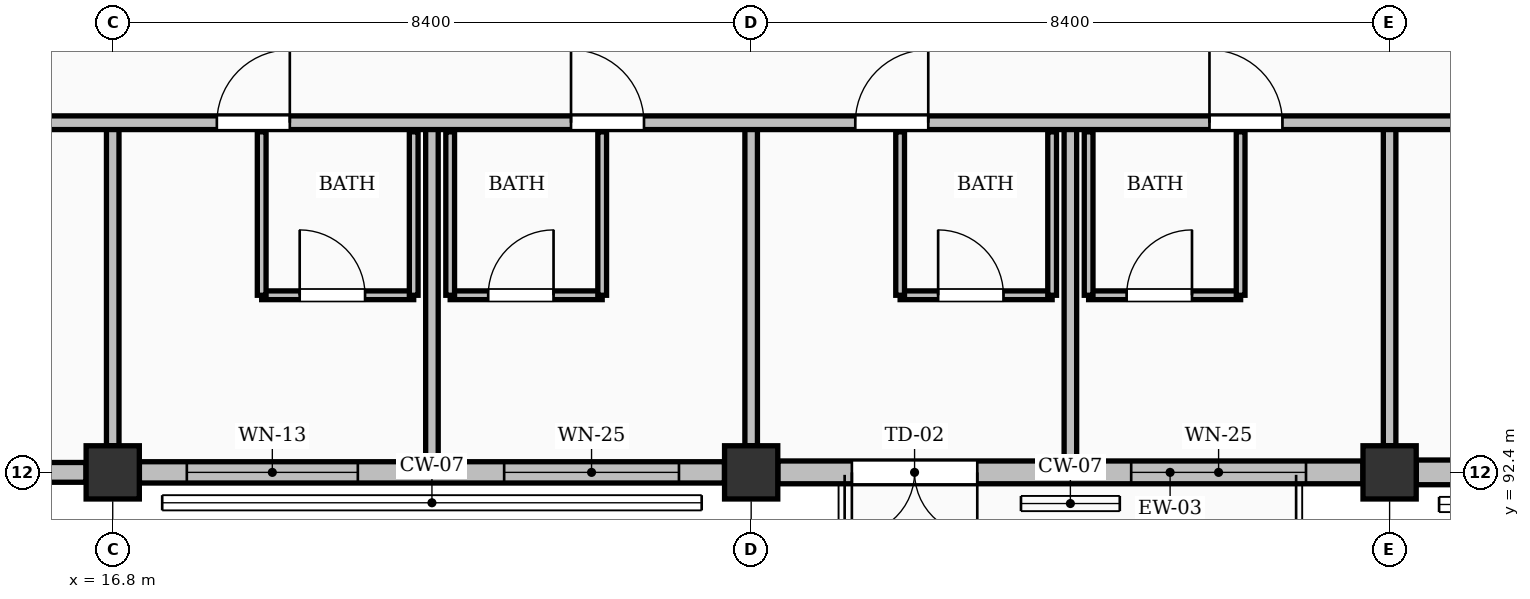
"""IFC4 building model, lengths in metres.
Left out: names, types, materials, properties, quantities, classifications, styles, units other than length and angle.
Written with IfcOpenShell. Run it as: python <this file> out.ifc"""

import sys

from ifc_helpers import new_model, si_unit, direction, frame, frame_2d, origin, origin_2d, place, context, subcontext, project, spatial, rectangle, extrude, element, fill, save


model = new_model("IFC4")
c1 = context("Model", 3, precision=1e-05, world=origin(), true_north=direction((0.0, 1.0)))
c2 = subcontext(c1, "Body", "Model", "MODEL_VIEW")
j1 = project(units=[si_unit("LENGTHUNIT", "METRE"), si_unit("PLANEANGLEUNIT", "RADIAN")], contexts=[c1])
p1 = place(None, origin())
s1 = spatial("IfcSite", under=j1, at=p1, CompositionType="ELEMENT")
p2 = place(p1, origin())
s2 = spatial("IfcBuilding", under=s1, at=p2, CompositionType="ELEMENT")
p3 = place(p2, frame((0.0, 0.0, 18.48)))
s3 = spatial("IfcBuildingStorey", under=s2, at=p3, CompositionType="ELEMENT", Elevation=18.48)
for number, where, z_axis, x_axis in (
    (1, (16.8, 92.4, 0.0), (0.0, 0.0, 1.0), (1.0, 0.0, 0.0)),
    (2, (25.2, 92.4, 0.0), (0.0, 0.0, 1.0), (1.0, 0.0, 0.0)),
    (3, (33.6, 92.4, 0.0), (0.0, 0.0, 1.0), (1.0, 0.0, 0.0)),
):
    element("IfcColumn", number, at=place(p3, frame(where, z_axis=z_axis, x_axis=x_axis)), inside=s3, PredefinedType="COLUMN", context=c2, shape_type="SweptSolid", body=[
        extrude(rectangle(XDim=0.7, YDim=0.7, at=origin_2d()), origin(), (0.0, 0.0, 1.0), 3.36),
    ])
p4 = place(p3, frame((8.751, 92.4, 0.0), z_axis=(0.0, 0.0, 1.0), x_axis=(1.0, 0.0, 0.0)))
e4 = element("IfcWall", 4, at=p4, inside=s3, PredefinedType="SOLIDWALL", context=c2, shape_type="SweptSolid", body=[
    extrude(rectangle(XDim=7.698, YDim=0.26, at=frame_2d((3.849, 0.0))), origin(), (0.0, 0.0, 1.0), 2.494),
])
p5 = place(p4, frame((1.024, 0.0, 0.0)))
e5 = element("IfcOpeningElement", 5, at=p5, cuts=e4, PredefinedType="OPENING", context=c2, shape_type="SweptSolid", body=[
    extrude(rectangle(XDim=1.55, YDim=2.08, at=frame_2d((0.775, 1.04))), frame((0.0, 0.14, 0.0), z_axis=(0.0, -1.0, 0.0), x_axis=(1.0, 0.0, 0.0)), (0.0, 0.0, 1.0), 0.28),
])
p6 = place(p4, frame((4.624, 0.0, 0.25)))
e6 = element("IfcOpeningElement", 6, at=p6, cuts=e4, PredefinedType="OPENING", context=c2, shape_type="SweptSolid", body=[
    extrude(rectangle(XDim=2.35, YDim=1.95, at=frame_2d((1.175, 0.975))), frame((0.0, 0.14, 0.0), z_axis=(0.0, -1.0, 0.0), x_axis=(1.0, 0.0, 0.0)), (0.0, 0.0, 1.0), 0.28),
])
p7 = place(p3, frame((17.151, 92.4, 0.0), z_axis=(0.0, 0.0, 1.0), x_axis=(1.0, 0.0, 0.0)))
e7 = element("IfcWall", 7, at=p7, inside=s3, PredefinedType="SOLIDWALL", context=c2, shape_type="SweptSolid", body=[
    extrude(rectangle(XDim=7.698, YDim=0.28, at=frame_2d((3.849, 0.0))), origin(), (0.0, 0.0, 1.0), 2.494),
])
p8 = place(p7, frame((0.624, 0.0, 0.25)))
e8 = element("IfcOpeningElement", 8, at=p8, cuts=e7, PredefinedType="OPENING", context=c2, shape_type="SweptSolid", body=[
    extrude(rectangle(XDim=2.25, YDim=2.05, at=frame_2d((1.125, 1.025))), frame((0.0, 0.15, 0.0), z_axis=(0.0, -1.0, 0.0), x_axis=(1.0, 0.0, 0.0)), (0.0, 0.0, 1.0), 0.3),
])
p9 = place(p7, frame((4.799, 0.0, 0.25)))
e9 = element("IfcOpeningElement", 9, at=p9, cuts=e7, PredefinedType="OPENING", context=c2, shape_type="SweptSolid", body=[
    extrude(rectangle(XDim=2.3, YDim=1.75, at=frame_2d((1.15, 0.875))), frame((0.0, 0.15, 0.0), z_axis=(0.0, -1.0, 0.0), x_axis=(1.0, 0.0, 0.0)), (0.0, 0.0, 1.0), 0.3),
])
p10 = place(p3, frame((25.551, 92.4, 0.0), z_axis=(0.0, 0.0, 1.0), x_axis=(1.0, 0.0, 0.0)))
e10 = element("IfcWall", 10, at=p10, inside=s3, PredefinedType="SOLIDWALL", context=c2, shape_type="SweptSolid", body=[
    extrude(rectangle(XDim=7.698, YDim=0.3, at=frame_2d((3.849, 0.0))), origin(), (0.0, 0.0, 1.0), 2.494),
])
p11 = place(p10, frame((0.974, 0.0, 0.0)))
e11 = element("IfcOpeningElement", 11, at=p11, cuts=e10, PredefinedType="OPENING", context=c2, shape_type="SweptSolid", body=[
    extrude(rectangle(XDim=1.65, YDim=2.08, at=frame_2d((0.825, 1.04))), frame((0.0, 0.16, 0.0), z_axis=(0.0, -1.0, 0.0), x_axis=(1.0, 0.0, 0.0)), (0.0, 0.0, 1.0), 0.32),
])
p12 = place(p10, frame((4.649, 0.0, 0.25)))
e12 = element("IfcOpeningElement", 12, at=p12, cuts=e10, PredefinedType="OPENING", context=c2, shape_type="SweptSolid", body=[
    extrude(rectangle(XDim=2.3, YDim=1.75, at=frame_2d((1.15, 0.875))), frame((0.0, 0.16, 0.0), z_axis=(0.0, -1.0, 0.0), x_axis=(1.0, 0.0, 0.0)), (0.0, 0.0, 1.0), 0.32),
])
p13 = place(p3, frame((33.951, 92.4, 0.0), z_axis=(0.0, 0.0, 1.0), x_axis=(1.0, 0.0, 0.0)))
e13 = element("IfcWall", 13, at=p13, inside=s3, PredefinedType="SOLIDWALL", context=c2, shape_type="SweptSolid", body=[
    extrude(rectangle(XDim=7.698, YDim=0.325, at=frame_2d((3.849, 0.0))), origin(), (0.0, 0.0, 1.0), 2.494),
])
p14 = place(p13, frame((0.549, 0.0, 0.25)))
e14 = element("IfcOpeningElement", 14, at=p14, cuts=e13, PredefinedType="OPENING", context=c2, shape_type="SweptSolid", body=[
    extrude(rectangle(XDim=2.4, YDim=1.75, at=frame_2d((1.2, 0.875))), frame((0.0, 0.172, 0.0), z_axis=(0.0, -1.0, 0.0), x_axis=(1.0, 0.0, 0.0)), (0.0, 0.0, 1.0), 0.345),
])
p15 = place(p13, frame((4.789, 0.0, 0.25)))
e15 = element("IfcOpeningElement", 15, at=p15, cuts=e13, PredefinedType="OPENING", context=c2, shape_type="SweptSolid", body=[
    extrude(rectangle(XDim=2.32, YDim=1.9, at=frame_2d((1.16, 0.95))), frame((0.0, 0.172, 0.0), z_axis=(0.0, -1.0, 0.0), x_axis=(1.0, 0.0, 0.0)), (0.0, 0.0, 1.0), 0.345),
])
p16 = place(p3, frame((18.76, 94.73, 0.0), z_axis=(0.0, 0.0, 1.0), x_axis=(1.0, 0.0, 0.0)))
e16 = element("IfcWall", 16, at=p16, inside=s3, PredefinedType="PARTITIONING", context=c2, shape_type="SweptSolid", body=[
    extrude(rectangle(XDim=2.0, YDim=0.115, at=frame_2d((1.0, 0.0))), origin(), (0.0, 0.0, 1.0), 3.12),
])
p17 = place(p16, frame((0.5, 0.0, 0.0)))
e17 = element("IfcOpeningElement", 17, at=p17, cuts=e16, PredefinedType="OPENING", context=c2, shape_type="SweptSolid", body=[
    extrude(rectangle(XDim=0.86, YDim=2.05, at=frame_2d((0.43, 1.025))), frame((0.0, 0.067, 0.0), z_axis=(0.0, -1.0, 0.0), x_axis=(1.0, 0.0, 0.0)), (0.0, 0.0, 1.0), 0.135),
])
p18 = place(p3, frame((18.76, 94.73, 0.0), z_axis=(0.0, 0.0, 1.0), x_axis=(0.0, 1.0, 0.0)))
e18 = element("IfcWall", 18, at=p18, inside=s3, PredefinedType="PARTITIONING", context=c2, shape_type="SweptSolid", body=[
    extrude(rectangle(XDim=2.15, YDim=0.115, at=frame_2d((1.075, 0.0))), origin(), (0.0, 0.0, 1.0), 2.642),
])
p19 = place(p3, frame((20.76, 94.73, 0.0), z_axis=(0.0, 0.0, 1.0), x_axis=(0.0, 1.0, 0.0)))
e19 = element("IfcWall", 19, at=p19, inside=s3, PredefinedType="PARTITIONING", context=c2, shape_type="SweptSolid", body=[
    extrude(rectangle(XDim=2.15, YDim=0.115, at=frame_2d((1.075, 0.0))), origin(), (0.0, 0.0, 1.0), 3.12),
])
p20 = place(p3, frame((21.24, 94.73, 0.0), z_axis=(0.0, 0.0, 1.0), x_axis=(1.0, 0.0, 0.0)))
e20 = element("IfcWall", 20, at=p20, inside=s3, PredefinedType="PARTITIONING", context=c2, shape_type="SweptSolid", body=[
    extrude(rectangle(XDim=2.0, YDim=0.115, at=frame_2d((1.0, 0.0))), origin(), (0.0, 0.0, 1.0), 3.12),
])
p21 = place(p20, frame((0.5, 0.0, 0.0)))
e21 = element("IfcOpeningElement", 21, at=p21, cuts=e20, PredefinedType="OPENING", context=c2, shape_type="SweptSolid", body=[
    extrude(rectangle(XDim=0.86, YDim=2.05, at=frame_2d((0.43, 1.025))), frame((0.0, 0.067, 0.0), z_axis=(0.0, -1.0, 0.0), x_axis=(1.0, 0.0, 0.0)), (0.0, 0.0, 1.0), 0.135),
])
p22 = place(p3, frame((21.24, 94.73, 0.0), z_axis=(0.0, 0.0, 1.0), x_axis=(0.0, 1.0, 0.0)))
e22 = element("IfcWall", 22, at=p22, inside=s3, PredefinedType="PARTITIONING", context=c2, shape_type="SweptSolid", body=[
    extrude(rectangle(XDim=2.15, YDim=0.115, at=frame_2d((1.075, 0.0))), origin(), (0.0, 0.0, 1.0), 3.12),
])
p23 = place(p3, frame((23.24, 94.73, 0.0), z_axis=(0.0, 0.0, 1.0), x_axis=(0.0, 1.0, 0.0)))
e23 = element("IfcWall", 23, at=p23, inside=s3, PredefinedType="PARTITIONING", context=c2, shape_type="SweptSolid", body=[
    extrude(rectangle(XDim=2.15, YDim=0.115, at=frame_2d((1.075, 0.0))), origin(), (0.0, 0.0, 1.0), 2.642),
])
p24 = place(p3, frame((21.0, 92.54, 0.0), z_axis=(0.0, 0.0, 1.0), x_axis=(0.0, 1.0, 0.0)))
e24 = element("IfcWall", 24, at=p24, inside=s3, PredefinedType="PARTITIONING", context=c2, shape_type="SweptSolid", body=[
    extrude(rectangle(XDim=4.46, YDim=0.165, at=frame_2d((2.23, 0.0))), origin(), (0.0, 0.0, 1.0), 3.12),
])
p25 = place(p3, frame((16.8, 92.75, 0.0), z_axis=(0.0, 0.0, 1.0), x_axis=(0.0, 1.0, 0.0)))
e25 = element("IfcWall", 25, at=p25, inside=s3, PredefinedType="PARTITIONING", context=c2, shape_type="SweptSolid", body=[
    extrude(rectangle(XDim=4.25, YDim=0.165, at=frame_2d((2.125, 0.0))), origin(), (0.0, 0.0, 1.0), 2.455),
])
p26 = place(p3, frame((27.16, 94.73, 0.0), z_axis=(0.0, 0.0, 1.0), x_axis=(1.0, 0.0, 0.0)))
e26 = element("IfcWall", 26, at=p26, inside=s3, PredefinedType="PARTITIONING", context=c2, shape_type="SweptSolid", body=[
    extrude(rectangle(XDim=2.0, YDim=0.115, at=frame_2d((1.0, 0.0))), origin(), (0.0, 0.0, 1.0), 3.12),
])
p27 = place(p26, frame((0.5, 0.0, 0.0)))
e27 = element("IfcOpeningElement", 27, at=p27, cuts=e26, PredefinedType="OPENING", context=c2, shape_type="SweptSolid", body=[
    extrude(rectangle(XDim=0.86, YDim=2.05, at=frame_2d((0.43, 1.025))), frame((0.0, 0.067, 0.0), z_axis=(0.0, -1.0, 0.0), x_axis=(1.0, 0.0, 0.0)), (0.0, 0.0, 1.0), 0.135),
])
for number, where, z_axis, x_axis in (
    (28, (27.16, 94.73, 0.0), (0.0, 0.0, 1.0), (0.0, 1.0, 0.0)),
    (29, (29.16, 94.73, 0.0), (0.0, 0.0, 1.0), (0.0, 1.0, 0.0)),
):
    element("IfcWall", number, at=place(p3, frame(where, z_axis=z_axis, x_axis=x_axis)), inside=s3, PredefinedType="PARTITIONING", context=c2, shape_type="SweptSolid", body=[
        extrude(rectangle(XDim=2.15, YDim=0.115, at=frame_2d((1.075, 0.0))), origin(), (0.0, 0.0, 1.0), 3.12),
    ])
p28 = place(p3, frame((29.64, 94.73, 0.0), z_axis=(0.0, 0.0, 1.0), x_axis=(1.0, 0.0, 0.0)))
e30 = element("IfcWall", 30, at=p28, inside=s3, PredefinedType="PARTITIONING", context=c2, shape_type="SweptSolid", body=[
    extrude(rectangle(XDim=2.0, YDim=0.115, at=frame_2d((1.0, 0.0))), origin(), (0.0, 0.0, 1.0), 3.12),
])
p29 = place(p28, frame((0.5, 0.0, 0.0)))
e31 = element("IfcOpeningElement", 31, at=p29, cuts=e30, PredefinedType="OPENING", context=c2, shape_type="SweptSolid", body=[
    extrude(rectangle(XDim=0.86, YDim=2.05, at=frame_2d((0.43, 1.025))), frame((0.0, 0.067, 0.0), z_axis=(0.0, -1.0, 0.0), x_axis=(1.0, 0.0, 0.0)), (0.0, 0.0, 1.0), 0.135),
])
for number, where, z_axis, x_axis in (
    (32, (29.64, 94.73, 0.0), (0.0, 0.0, 1.0), (0.0, 1.0, 0.0)),
    (33, (31.64, 94.73, 0.0), (0.0, 0.0, 1.0), (0.0, 1.0, 0.0)),
):
    element("IfcWall", number, at=place(p3, frame(where, z_axis=z_axis, x_axis=x_axis)), inside=s3, PredefinedType="PARTITIONING", context=c2, shape_type="SweptSolid", body=[
        extrude(rectangle(XDim=2.15, YDim=0.115, at=frame_2d((1.075, 0.0))), origin(), (0.0, 0.0, 1.0), 3.12),
    ])
p30 = place(p3, frame((29.4, 92.55, 0.0), z_axis=(0.0, 0.0, 1.0), x_axis=(0.0, 1.0, 0.0)))
e34 = element("IfcWall", 34, at=p30, inside=s3, PredefinedType="PARTITIONING", context=c2, shape_type="SweptSolid", body=[
    extrude(rectangle(XDim=4.45, YDim=0.165, at=frame_2d((2.225, 0.0))), origin(), (0.0, 0.0, 1.0), 3.12),
])
for number, where, z_axis, x_axis in (
    (35, (25.2, 92.75, 0.0), (0.0, 0.0, 1.0), (0.0, 1.0, 0.0)),
    (36, (33.6, 92.75, 0.0), (0.0, 0.0, 1.0), (0.0, 1.0, 0.0)),
):
    element("IfcWall", number, at=place(p3, frame(where, z_axis=z_axis, x_axis=x_axis)), inside=s3, PredefinedType="PARTITIONING", context=c2, shape_type="SweptSolid", body=[
        extrude(rectangle(XDim=4.25, YDim=0.165, at=frame_2d((2.125, 0.0))), origin(), (0.0, 0.0, 1.0), 2.455),
    ])
p31 = place(p3, frame((0.225, 97.0, 0.0), z_axis=(0.0, 0.0, 1.0), x_axis=(1.0, 0.0, 0.0)))
e37 = element("IfcWall", 37, at=p31, inside=s3, PredefinedType="PARTITIONING", context=c2, shape_type="SweptSolid", body=[
    extrude(rectangle(XDim=50.175, YDim=0.18, at=frame_2d((25.087, 0.0))), origin(), (0.0, 0.0, 1.0), 3.12),
])
p32 = place(p31, frame((1.145, 0.0, 0.0)))
e38 = element("IfcOpeningElement", 38, at=p32, cuts=e37, PredefinedType="OPENING", context=c2, shape_type="SweptSolid", body=[
    extrude(rectangle(XDim=0.96, YDim=2.15, at=frame_2d((0.48, 1.075))), frame((0.0, 0.1, 0.0), z_axis=(0.0, -1.0, 0.0), x_axis=(1.0, 0.0, 0.0)), (0.0, 0.0, 1.0), 0.2),
])
p33 = place(p31, frame((5.805, 0.0, 0.0)))
e39 = element("IfcOpeningElement", 39, at=p33, cuts=e37, PredefinedType="OPENING", context=c2, shape_type="SweptSolid", body=[
    extrude(rectangle(XDim=0.96, YDim=2.15, at=frame_2d((0.48, 1.075))), frame((0.0, 0.1, 0.0), z_axis=(0.0, -1.0, 0.0), x_axis=(1.0, 0.0, 0.0)), (0.0, 0.0, 1.0), 0.2),
])
p34 = place(p31, frame((9.545, 0.0, 0.0)))
e40 = element("IfcOpeningElement", 40, at=p34, cuts=e37, PredefinedType="OPENING", context=c2, shape_type="SweptSolid", body=[
    extrude(rectangle(XDim=0.96, YDim=2.15, at=frame_2d((0.48, 1.075))), frame((0.0, 0.1, 0.0), z_axis=(0.0, -1.0, 0.0), x_axis=(1.0, 0.0, 0.0)), (0.0, 0.0, 1.0), 0.2),
])
p35 = place(p31, frame((14.205, 0.0, 0.0)))
e41 = element("IfcOpeningElement", 41, at=p35, cuts=e37, PredefinedType="OPENING", context=c2, shape_type="SweptSolid", body=[
    extrude(rectangle(XDim=0.96, YDim=2.15, at=frame_2d((0.48, 1.075))), frame((0.0, 0.1, 0.0), z_axis=(0.0, -1.0, 0.0), x_axis=(1.0, 0.0, 0.0)), (0.0, 0.0, 1.0), 0.2),
])
p36 = place(p31, frame((17.945, 0.0, 0.0)))
e42 = element("IfcOpeningElement", 42, at=p36, cuts=e37, PredefinedType="OPENING", context=c2, shape_type="SweptSolid", body=[
    extrude(rectangle(XDim=0.96, YDim=2.15, at=frame_2d((0.48, 1.075))), frame((0.0, 0.1, 0.0), z_axis=(0.0, -1.0, 0.0), x_axis=(1.0, 0.0, 0.0)), (0.0, 0.0, 1.0), 0.2),
])
p37 = place(p31, frame((22.605, 0.0, 0.0)))
e43 = element("IfcOpeningElement", 43, at=p37, cuts=e37, PredefinedType="OPENING", context=c2, shape_type="SweptSolid", body=[
    extrude(rectangle(XDim=0.96, YDim=2.15, at=frame_2d((0.48, 1.075))), frame((0.0, 0.1, 0.0), z_axis=(0.0, -1.0, 0.0), x_axis=(1.0, 0.0, 0.0)), (0.0, 0.0, 1.0), 0.2),
])
p38 = place(p31, frame((26.345, 0.0, 0.0)))
e44 = element("IfcOpeningElement", 44, at=p38, cuts=e37, PredefinedType="OPENING", context=c2, shape_type="SweptSolid", body=[
    extrude(rectangle(XDim=0.96, YDim=2.15, at=frame_2d((0.48, 1.075))), frame((0.0, 0.1, 0.0), z_axis=(0.0, -1.0, 0.0), x_axis=(1.0, 0.0, 0.0)), (0.0, 0.0, 1.0), 0.2),
])
p39 = place(p31, frame((31.005, 0.0, 0.0)))
e45 = element("IfcOpeningElement", 45, at=p39, cuts=e37, PredefinedType="OPENING", context=c2, shape_type="SweptSolid", body=[
    extrude(rectangle(XDim=0.96, YDim=2.15, at=frame_2d((0.48, 1.075))), frame((0.0, 0.1, 0.0), z_axis=(0.0, -1.0, 0.0), x_axis=(1.0, 0.0, 0.0)), (0.0, 0.0, 1.0), 0.2),
])
p40 = place(p31, frame((34.745, 0.0, 0.0)))
e46 = element("IfcOpeningElement", 46, at=p40, cuts=e37, PredefinedType="OPENING", context=c2, shape_type="SweptSolid", body=[
    extrude(rectangle(XDim=0.96, YDim=2.15, at=frame_2d((0.48, 1.075))), frame((0.0, 0.1, 0.0), z_axis=(0.0, -1.0, 0.0), x_axis=(1.0, 0.0, 0.0)), (0.0, 0.0, 1.0), 0.2),
])
p41 = place(p31, frame((39.405, 0.0, 0.0)))
e47 = element("IfcOpeningElement", 47, at=p41, cuts=e37, PredefinedType="OPENING", context=c2, shape_type="SweptSolid", body=[
    extrude(rectangle(XDim=0.96, YDim=2.15, at=frame_2d((0.48, 1.075))), frame((0.0, 0.1, 0.0), z_axis=(0.0, -1.0, 0.0), x_axis=(1.0, 0.0, 0.0)), (0.0, 0.0, 1.0), 0.2),
])
p42 = place(p31, frame((45.175, 0.0, 0.0)))
e48 = element("IfcOpeningElement", 48, at=p42, cuts=e37, PredefinedType="OPENING", context=c2, shape_type="SweptSolid", body=[
    extrude(rectangle(XDim=1.62, YDim=2.2, at=frame_2d((0.81, 1.1))), frame((0.0, 0.1, 0.0), z_axis=(0.0, -1.0, 0.0), x_axis=(1.0, 0.0, 0.0)), (0.0, 0.0, 1.0), 0.2),
])
p43 = place(p8, origin())
e49 = element("IfcWindow", 49, at=p43, inside=s3, PartitioningType="DOUBLE_PANEL_VERTICAL", PredefinedType="WINDOW", context=c2, shape_type="SweptSolid", body=[
    extrude(rectangle(XDim=2.25, YDim=2.05, at=frame_2d((1.125, 1.025))), frame((0.0, 0.03, 0.0), z_axis=(0.0, -1.0, 0.0), x_axis=(1.0, 0.0, 0.0)), (0.0, 0.0, 1.0), 0.06),
])
fill(e8, e49)
p44 = place(p9, origin())
e50 = element("IfcWindow", 50, at=p44, inside=s3, PartitioningType="DOUBLE_PANEL_VERTICAL", PredefinedType="WINDOW", context=c2, shape_type="SweptSolid", body=[
    extrude(rectangle(XDim=2.3, YDim=1.75, at=frame_2d((1.15, 0.875))), frame((0.0, 0.03, 0.0), z_axis=(0.0, -1.0, 0.0), x_axis=(1.0, 0.0, 0.0)), (0.0, 0.0, 1.0), 0.06),
])
fill(e9, e50)
p45 = place(p11, frame((1.65, 0.0, 0.0), z_axis=(0.0, 0.0, 1.0), x_axis=(-1.0, 0.0, 0.0)))
e51 = element("IfcDoor", 51, at=p45, inside=s3, OperationType="DOUBLE_DOOR_SINGLE_SWING", PredefinedType="DOOR", context=c2, shape_type="SweptSolid", body=[
    extrude(rectangle(XDim=1.65, YDim=2.08, at=frame_2d((0.825, 1.04))), frame((0.0, 0.025, 0.0), z_axis=(0.0, -1.0, 0.0), x_axis=(1.0, 0.0, 0.0)), (0.0, 0.0, 1.0), 0.05),
])
fill(e11, e51)
p46 = place(p12, origin())
e52 = element("IfcWindow", 52, at=p46, inside=s3, PartitioningType="DOUBLE_PANEL_VERTICAL", PredefinedType="WINDOW", context=c2, shape_type="SweptSolid", body=[
    extrude(rectangle(XDim=2.3, YDim=1.75, at=frame_2d((1.15, 0.875))), frame((0.0, 0.03, 0.0), z_axis=(0.0, -1.0, 0.0), x_axis=(1.0, 0.0, 0.0)), (0.0, 0.0, 1.0), 0.06),
])
fill(e12, e52)
p47 = place(p17, origin())
e53 = element("IfcDoor", 53, at=p47, inside=s3, OperationType="SINGLE_SWING_LEFT", PredefinedType="DOOR", context=c2, shape_type="SweptSolid", body=[
    extrude(rectangle(XDim=0.86, YDim=2.05, at=frame_2d((0.43, 1.025))), frame((0.0, 0.025, 0.0), z_axis=(0.0, -1.0, 0.0), x_axis=(1.0, 0.0, 0.0)), (0.0, 0.0, 1.0), 0.05),
])
fill(e17, e53)
p48 = place(p21, origin())
e54 = element("IfcDoor", 54, at=p48, inside=s3, OperationType="SINGLE_SWING_RIGHT", PredefinedType="DOOR", context=c2, shape_type="SweptSolid", body=[
    extrude(rectangle(XDim=0.86, YDim=2.05, at=frame_2d((0.43, 1.025))), frame((0.0, 0.025, 0.0), z_axis=(0.0, -1.0, 0.0), x_axis=(1.0, 0.0, 0.0)), (0.0, 0.0, 1.0), 0.05),
])
fill(e21, e54)
p49 = place(p27, origin())
e55 = element("IfcDoor", 55, at=p49, inside=s3, OperationType="SINGLE_SWING_LEFT", PredefinedType="DOOR", context=c2, shape_type="SweptSolid", body=[
    extrude(rectangle(XDim=0.86, YDim=2.05, at=frame_2d((0.43, 1.025))), frame((0.0, 0.025, 0.0), z_axis=(0.0, -1.0, 0.0), x_axis=(1.0, 0.0, 0.0)), (0.0, 0.0, 1.0), 0.05),
])
fill(e27, e55)
p50 = place(p29, origin())
e56 = element("IfcDoor", 56, at=p50, inside=s3, OperationType="SINGLE_SWING_RIGHT", PredefinedType="DOOR", context=c2, shape_type="SweptSolid", body=[
    extrude(rectangle(XDim=0.86, YDim=2.05, at=frame_2d((0.43, 1.025))), frame((0.0, 0.025, 0.0), z_axis=(0.0, -1.0, 0.0), x_axis=(1.0, 0.0, 0.0)), (0.0, 0.0, 1.0), 0.05),
])
fill(e31, e56)
p51 = place(p36, origin())
e57 = element("IfcDoor", 57, at=p51, inside=s3, OperationType="SINGLE_SWING_RIGHT", PredefinedType="DOOR", context=c2, shape_type="SweptSolid", body=[
    extrude(rectangle(XDim=0.96, YDim=2.15, at=frame_2d((0.48, 1.075))), frame((0.0, 0.025, 0.0), z_axis=(0.0, -1.0, 0.0), x_axis=(1.0, 0.0, 0.0)), (0.0, 0.0, 1.0), 0.05),
])
fill(e42, e57)
p52 = place(p37, origin())
e58 = element("IfcDoor", 58, at=p52, inside=s3, OperationType="SINGLE_SWING_LEFT", PredefinedType="DOOR", context=c2, shape_type="SweptSolid", body=[
    extrude(rectangle(XDim=0.96, YDim=2.15, at=frame_2d((0.48, 1.075))), frame((0.0, 0.025, 0.0), z_axis=(0.0, -1.0, 0.0), x_axis=(1.0, 0.0, 0.0)), (0.0, 0.0, 1.0), 0.05),
])
fill(e43, e58)
p53 = place(p38, origin())
e59 = element("IfcDoor", 59, at=p53, inside=s3, OperationType="SINGLE_SWING_RIGHT", PredefinedType="DOOR", context=c2, shape_type="SweptSolid", body=[
    extrude(rectangle(XDim=0.96, YDim=2.15, at=frame_2d((0.48, 1.075))), frame((0.0, 0.025, 0.0), z_axis=(0.0, -1.0, 0.0), x_axis=(1.0, 0.0, 0.0)), (0.0, 0.0, 1.0), 0.05),
])
fill(e44, e59)
p54 = place(p39, origin())
e60 = element("IfcDoor", 60, at=p54, inside=s3, OperationType="SINGLE_SWING_LEFT", PredefinedType="DOOR", context=c2, shape_type="SweptSolid", body=[
    extrude(rectangle(XDim=0.96, YDim=2.15, at=frame_2d((0.48, 1.075))), frame((0.0, 0.025, 0.0), z_axis=(0.0, -1.0, 0.0), x_axis=(1.0, 0.0, 0.0)), (0.0, 0.0, 1.0), 0.05),
])
fill(e45, e60)
save(model, sys.argv[1])
